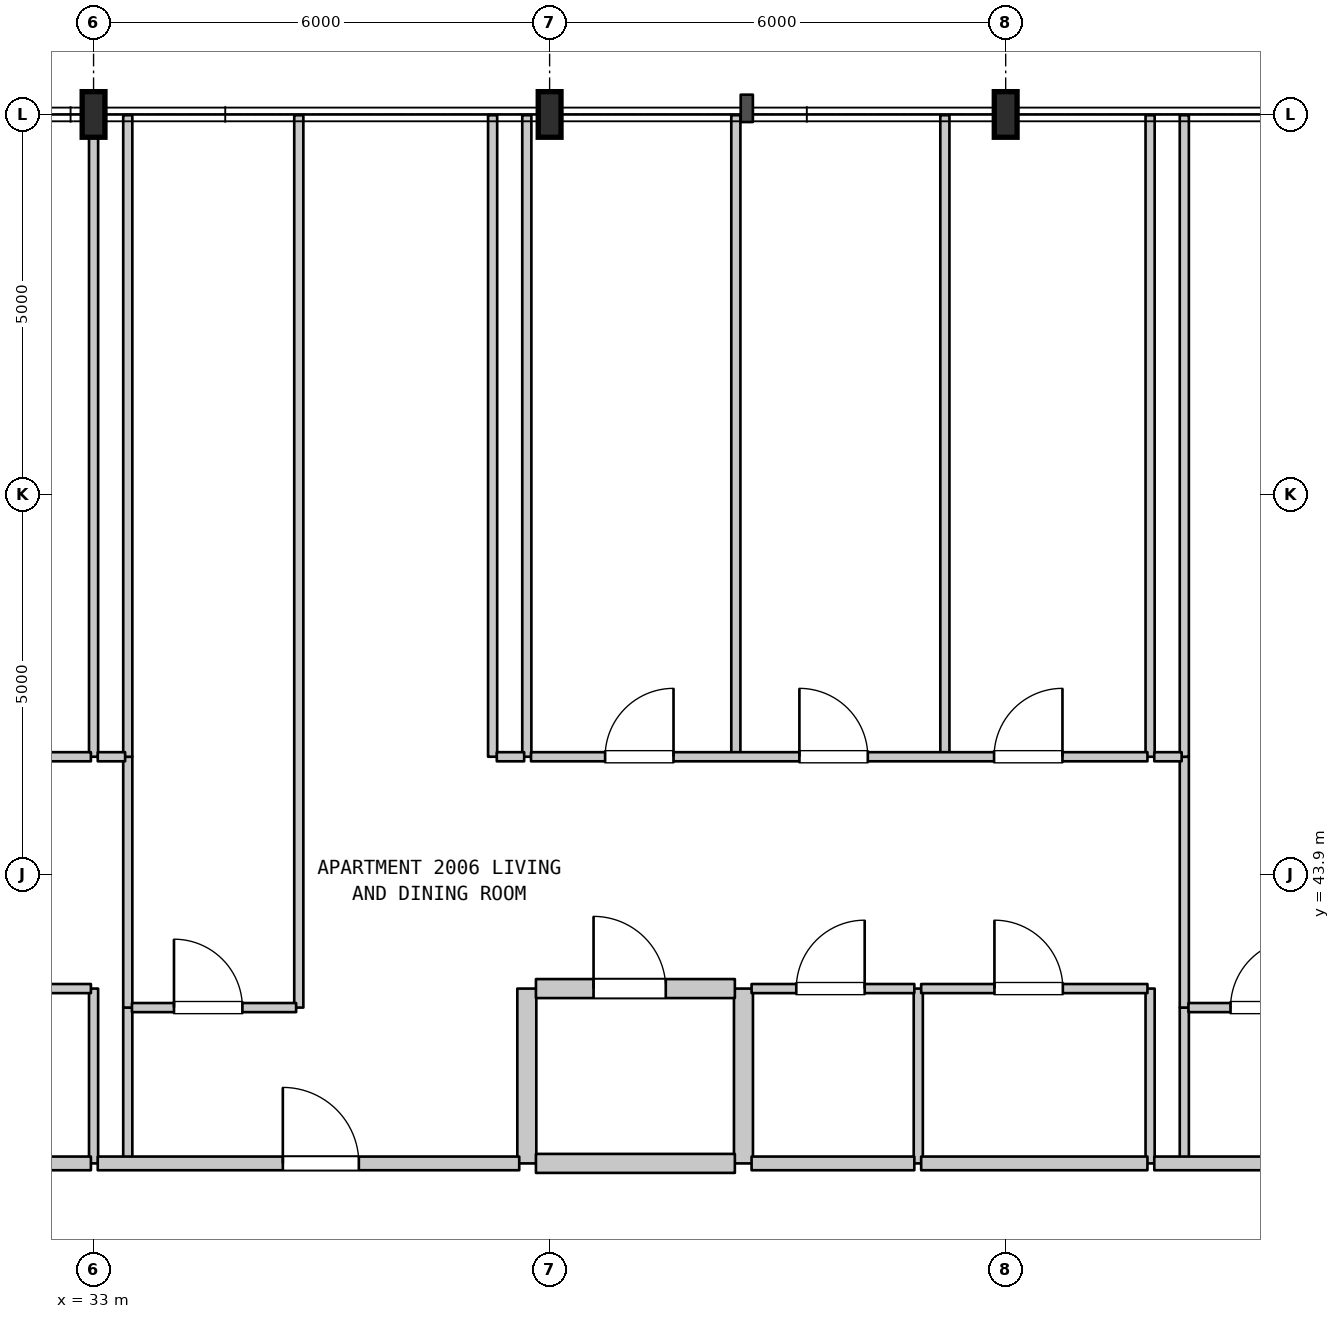
"""IFC4 building model, lengths in metres.
Left out: names, types, materials, properties, quantities, classifications, styles, units other than length and angle.
Written with IfcOpenShell. Run it as: python <this file> out.ifc"""

import sys

from ifc_helpers import new_model, si_unit, direction, frame, frame_2d, origin, origin_2d, place, context, subcontext, project, spatial, rectangle, i_section, extrude, element, fill, save


model = new_model("IFC4")
c1 = context("Model", 3, precision=1e-05, world=origin(), true_north=direction((0.0, 1.0)))
c2 = subcontext(c1, "Body", "Model", "MODEL_VIEW")
j1 = project(units=[si_unit("LENGTHUNIT", "METRE"), si_unit("PLANEANGLEUNIT", "RADIAN")], contexts=[c1])
p1 = place(None, origin())
s1 = spatial("IfcSite", under=j1, at=p1, CompositionType="ELEMENT")
p2 = place(p1, origin())
s2 = spatial("IfcBuilding", under=s1, at=p2, CompositionType="ELEMENT")
p3 = place(p2, frame((0.0, 0.0, 86.4)))
s3 = spatial("IfcBuildingStorey", under=s2, at=p3, CompositionType="ELEMENT", Elevation=86.4)
for number, where, z_axis, x_axis in (
    (1, (33.0, 53.9, 0.0), (0.0, 0.0, 1.0), (1.0, 0.0, 0.0)),
    (2, (39.0, 53.9, 0.0), (0.0, 0.0, 1.0), (1.0, 0.0, 0.0)),
    (3, (45.0, 53.9, 0.0), (0.0, 0.0, 1.0), (1.0, 0.0, 0.0)),
):
    element("IfcColumn", number, at=place(p3, frame(where, z_axis=z_axis, x_axis=x_axis)), inside=s3, PredefinedType="COLUMN", context=c2, shape_type="SweptSolid", body=[
        extrude(i_section(OverallWidth=0.3, OverallDepth=0.6, WebThickness=0.015, FlangeThickness=0.03, FilletRadius=0.027, at=origin_2d()), origin(), (0.0, 0.0, 1.0), 4.5),
    ])
p4 = place(p3, frame((33.0, 40.1, 0.0), z_axis=(0.0, 0.0, 1.0), x_axis=(0.0, 1.0, 0.0)))
e4 = element("IfcWall", 4, at=p4, inside=s3, PredefinedType="PARTITIONING", context=c2, shape_type="SweptSolid", body=[
    extrude(rectangle(XDim=2.3, YDim=0.12, at=frame_2d((1.15, 0.0))), origin(), (0.0, 0.0, 1.0), 3.585),
])
p5 = place(p3, frame((33.0, 45.45, 0.0), z_axis=(0.0, 0.0, 1.0), x_axis=(0.0, 1.0, 0.0)))
e5 = element("IfcWall", 5, at=p5, inside=s3, PredefinedType="PARTITIONING", context=c2, shape_type="SweptSolid", body=[
    extrude(rectangle(XDim=8.44, YDim=0.12, at=frame_2d((4.22, 0.0))), origin(), (0.0, 0.0, 1.0), 3.585),
])
p6 = place(p3, frame((33.45, 40.1, 0.0), z_axis=(0.0, 0.0, 1.0), x_axis=(0.0, 1.0, 0.0)))
e6 = element("IfcWall", 6, at=p6, inside=s3, PredefinedType="PARTITIONING", context=c2, shape_type="SweptSolid", body=[
    extrude(rectangle(XDim=2.05, YDim=0.12, at=frame_2d((1.025, 0.0))), origin(), (0.0, 0.0, 1.0), 4.185),
])
p7 = place(p3, frame((33.45, 42.15, 0.0), z_axis=(0.0, 0.0, 1.0), x_axis=(0.0, 1.0, 0.0)))
e7 = element("IfcWall", 7, at=p7, inside=s3, PredefinedType="PARTITIONING", context=c2, shape_type="SweptSolid", body=[
    extrude(rectangle(XDim=3.3, YDim=0.12, at=frame_2d((1.65, 0.0))), origin(), (0.0, 0.0, 1.0), 4.185),
])
p8 = place(p3, frame((33.45, 45.45, 0.0), z_axis=(0.0, 0.0, 1.0), x_axis=(0.0, 1.0, 0.0)))
e8 = element("IfcWall", 8, at=p8, inside=s3, PredefinedType="PARTITIONING", context=c2, shape_type="SweptSolid", body=[
    extrude(rectangle(XDim=8.44, YDim=0.12, at=frame_2d((4.22, 0.0))), origin(), (0.0, 0.0, 1.0), 4.185),
])
p9 = place(p3, frame((35.7, 42.15, 0.0), z_axis=(0.0, 0.0, 1.0), x_axis=(0.0, 1.0, 0.0)))
e9 = element("IfcWall", 9, at=p9, inside=s3, PredefinedType="PARTITIONING", context=c2, shape_type="SweptSolid", body=[
    extrude(rectangle(XDim=11.74, YDim=0.12, at=frame_2d((5.87, 0.0))), origin(), (0.0, 0.0, 1.0), 4.185),
])
p10 = place(p3, frame((38.25, 45.45, 0.0), z_axis=(0.0, 0.0, 1.0), x_axis=(0.0, 1.0, 0.0)))
e10 = element("IfcWall", 10, at=p10, inside=s3, PredefinedType="PARTITIONING", context=c2, shape_type="SweptSolid", body=[
    extrude(rectangle(XDim=8.44, YDim=0.12, at=frame_2d((4.22, 0.0))), origin(), (0.0, 0.0, 1.0), 4.185),
])
p11 = place(p3, frame((38.7, 40.1, 0.0), z_axis=(0.0, 0.0, 1.0), x_axis=(0.0, 1.0, 0.0)))
e11 = element("IfcWall", 11, at=p11, inside=s3, PredefinedType="STANDARD", context=c2, shape_type="SweptSolid", body=[
    extrude(rectangle(XDim=2.3, YDim=0.25, at=frame_2d((1.15, 0.0))), origin(), (0.0, 0.0, 1.0), 4.185),
])
for number, where, z_axis, x_axis in (
    (12, (38.7, 45.45, 0.0), (0.0, 0.0, 1.0), (0.0, 1.0, 0.0)),
    (13, (41.45, 45.45, 0.0), (0.0, 0.0, 1.0), (0.0, 1.0, 0.0)),
):
    element("IfcWall", number, at=place(p3, frame(where, z_axis=z_axis, x_axis=x_axis)), inside=s3, PredefinedType="PARTITIONING", context=c2, shape_type="SweptSolid", body=[
        extrude(rectangle(XDim=8.44, YDim=0.12, at=frame_2d((4.22, 0.0))), origin(), (0.0, 0.0, 1.0), 4.185),
    ])
p12 = place(p3, frame((41.55, 40.1, 0.0), z_axis=(0.0, 0.0, 1.0), x_axis=(0.0, 1.0, 0.0)))
e14 = element("IfcWall", 14, at=p12, inside=s3, PredefinedType="STANDARD", context=c2, shape_type="SweptSolid", body=[
    extrude(rectangle(XDim=2.3, YDim=0.25, at=frame_2d((1.15, 0.0))), origin(), (0.0, 0.0, 1.0), 4.185),
])
p13 = place(p3, frame((43.85, 40.1, 0.0), z_axis=(0.0, 0.0, 1.0), x_axis=(0.0, 1.0, 0.0)))
e15 = element("IfcWall", 15, at=p13, inside=s3, PredefinedType="PARTITIONING", context=c2, shape_type="SweptSolid", body=[
    extrude(rectangle(XDim=2.3, YDim=0.12, at=frame_2d((1.15, 0.0))), origin(), (0.0, 0.0, 1.0), 4.185),
])
p14 = place(p3, frame((44.2, 45.45, 0.0), z_axis=(0.0, 0.0, 1.0), x_axis=(0.0, 1.0, 0.0)))
e16 = element("IfcWall", 16, at=p14, inside=s3, PredefinedType="PARTITIONING", context=c2, shape_type="SweptSolid", body=[
    extrude(rectangle(XDim=8.44, YDim=0.12, at=frame_2d((4.22, 0.0))), origin(), (0.0, 0.0, 1.0), 4.185),
])
p15 = place(p3, frame((46.9, 40.1, 0.0), z_axis=(0.0, 0.0, 1.0), x_axis=(0.0, 1.0, 0.0)))
e17 = element("IfcWall", 17, at=p15, inside=s3, PredefinedType="PARTITIONING", context=c2, shape_type="SweptSolid", body=[
    extrude(rectangle(XDim=2.3, YDim=0.12, at=frame_2d((1.15, 0.0))), origin(), (0.0, 0.0, 1.0), 4.185),
])
p16 = place(p3, frame((46.9, 45.45, 0.0), z_axis=(0.0, 0.0, 1.0), x_axis=(0.0, 1.0, 0.0)))
e18 = element("IfcWall", 18, at=p16, inside=s3, PredefinedType="PARTITIONING", context=c2, shape_type="SweptSolid", body=[
    extrude(rectangle(XDim=8.44, YDim=0.12, at=frame_2d((4.22, 0.0))), origin(), (0.0, 0.0, 1.0), 4.185),
])
p17 = place(p3, frame((47.35, 40.1, 0.0), z_axis=(0.0, 0.0, 1.0), x_axis=(0.0, 1.0, 0.0)))
e19 = element("IfcWall", 19, at=p17, inside=s3, PredefinedType="PARTITIONING", context=c2, shape_type="SweptSolid", body=[
    extrude(rectangle(XDim=2.05, YDim=0.12, at=frame_2d((1.025, 0.0))), origin(), (0.0, 0.0, 1.0), 4.185),
])
p18 = place(p3, frame((47.35, 42.15, 0.0), z_axis=(0.0, 0.0, 1.0), x_axis=(0.0, 1.0, 0.0)))
e20 = element("IfcWall", 20, at=p18, inside=s3, PredefinedType="PARTITIONING", context=c2, shape_type="SweptSolid", body=[
    extrude(rectangle(XDim=3.3, YDim=0.12, at=frame_2d((1.65, 0.0))), origin(), (0.0, 0.0, 1.0), 4.185),
])
p19 = place(p3, frame((47.35, 45.45, 0.0), z_axis=(0.0, 0.0, 1.0), x_axis=(0.0, 1.0, 0.0)))
e21 = element("IfcWall", 21, at=p19, inside=s3, PredefinedType="PARTITIONING", context=c2, shape_type="SweptSolid", body=[
    extrude(rectangle(XDim=8.44, YDim=0.12, at=frame_2d((4.22, 0.0))), origin(), (0.0, 0.0, 1.0), 4.185),
])
p20 = place(p3, frame((29.383, 40.1, 0.0), z_axis=(0.0, 0.0, 1.0), x_axis=(1.0, 0.0, 0.0)))
e22 = element("IfcWall", 22, at=p20, inside=s3, PredefinedType="STANDARD", context=c2, shape_type="SweptSolid", body=[
    extrude(rectangle(XDim=3.582, YDim=0.18, at=frame_2d((1.791, 0.0))), origin(), (0.0, 0.0, 1.0), 4.185),
])
p21 = place(p3, frame((33.055, 40.1, 0.0), z_axis=(0.0, 0.0, 1.0), x_axis=(1.0, 0.0, 0.0)))
e23 = element("IfcWall", 23, at=p21, inside=s3, PredefinedType="STANDARD", context=c2, shape_type="SweptSolid", body=[
    extrude(rectangle(XDim=5.545, YDim=0.18, at=frame_2d((2.772, 0.0))), origin(), (0.0, 0.0, 1.0), 4.185),
])
p22 = place(p21, frame((2.435, 0.0, 0.0)))
e24 = element("IfcOpeningElement", 24, at=p22, cuts=e23, PredefinedType="OPENING", context=c2, shape_type="SweptSolid", body=[
    extrude(rectangle(XDim=1.0, YDim=2.15, at=frame_2d((0.5, 1.075))), frame((0.0, 0.1, 0.0), z_axis=(0.0, -1.0, 0.0), x_axis=(1.0, 0.0, 0.0)), (0.0, 0.0, 1.0), 0.2),
])
p23 = place(p3, frame((38.82, 40.1, 0.0), z_axis=(0.0, 0.0, 1.0), x_axis=(1.0, 0.0, 0.0)))
e25 = element("IfcWall", 25, at=p23, inside=s3, PredefinedType="STANDARD", context=c2, shape_type="SweptSolid", body=[
    extrude(rectangle(XDim=2.617, YDim=0.25, at=frame_2d((1.309, 0.0))), origin(), (0.0, 0.0, 1.0), 4.185),
])
p24 = place(p3, frame((41.657, 40.1, 0.0), z_axis=(0.0, 0.0, 1.0), x_axis=(1.0, 0.0, 0.0)))
e26 = element("IfcWall", 26, at=p24, inside=s3, PredefinedType="STANDARD", context=c2, shape_type="SweptSolid", body=[
    extrude(rectangle(XDim=2.141, YDim=0.18, at=frame_2d((1.071, 0.0))), origin(), (0.0, 0.0, 1.0), 4.185),
])
p25 = place(p3, frame((43.888, 40.1, 0.0), z_axis=(0.0, 0.0, 1.0), x_axis=(1.0, 0.0, 0.0)))
e27 = element("IfcWall", 27, at=p25, inside=s3, PredefinedType="STANDARD", context=c2, shape_type="SweptSolid", body=[
    extrude(rectangle(XDim=2.977, YDim=0.18, at=frame_2d((1.489, 0.0))), origin(), (0.0, 0.0, 1.0), 4.185),
])
p26 = place(p3, frame((46.955, 40.1, 0.0), z_axis=(0.0, 0.0, 1.0), x_axis=(1.0, 0.0, 0.0)))
e28 = element("IfcWall", 28, at=p26, inside=s3, PredefinedType="STANDARD", context=c2, shape_type="SweptSolid", body=[
    extrude(rectangle(XDim=5.61, YDim=0.18, at=frame_2d((2.805, 0.0))), origin(), (0.0, 0.0, 1.0), 4.185),
])
p27 = place(p26, frame((2.435, 0.0, 0.0)))
e29 = element("IfcOpeningElement", 29, at=p27, cuts=e28, PredefinedType="OPENING", context=c2, shape_type="SweptSolid", body=[
    extrude(rectangle(XDim=1.0, YDim=2.15, at=frame_2d((0.5, 1.075))), frame((0.0, 0.1, 0.0), z_axis=(0.0, -1.0, 0.0), x_axis=(1.0, 0.0, 0.0)), (0.0, 0.0, 1.0), 0.2),
])
p28 = place(p3, frame((33.505, 42.15, 0.0), z_axis=(0.0, 0.0, 1.0), x_axis=(1.0, 0.0, 0.0)))
e30 = element("IfcWall", 30, at=p28, inside=s3, PredefinedType="PARTITIONING", context=c2, shape_type="SweptSolid", body=[
    extrude(rectangle(XDim=2.16, YDim=0.12, at=frame_2d((1.08, 0.0))), origin(), (0.0, 0.0, 1.0), 4.185),
])
p29 = place(p28, frame((0.553, 0.0, 0.0)))
e31 = element("IfcOpeningElement", 31, at=p29, cuts=e30, PredefinedType="OPENING", context=c2, shape_type="SweptSolid", body=[
    extrude(rectangle(XDim=0.9, YDim=2.15, at=frame_2d((0.45, 1.075))), frame((0.0, 0.07, 0.0), z_axis=(0.0, -1.0, 0.0), x_axis=(1.0, 0.0, 0.0)), (0.0, 0.0, 1.0), 0.14),
])
p30 = place(p3, frame((47.405, 42.15, 0.0), z_axis=(0.0, 0.0, 1.0), x_axis=(1.0, 0.0, 0.0)))
e32 = element("IfcWall", 32, at=p30, inside=s3, PredefinedType="PARTITIONING", context=c2, shape_type="SweptSolid", body=[
    extrude(rectangle(XDim=2.16, YDim=0.12, at=frame_2d((1.08, 0.0))), origin(), (0.0, 0.0, 1.0), 4.185),
])
p31 = place(p30, frame((0.553, 0.0, 0.0)))
e33 = element("IfcOpeningElement", 33, at=p31, cuts=e32, PredefinedType="OPENING", context=c2, shape_type="SweptSolid", body=[
    extrude(rectangle(XDim=0.9, YDim=2.15, at=frame_2d((0.45, 1.075))), frame((0.0, 0.07, 0.0), z_axis=(0.0, -1.0, 0.0), x_axis=(1.0, 0.0, 0.0)), (0.0, 0.0, 1.0), 0.14),
])
p32 = place(p3, frame((29.383, 42.4, 0.0), z_axis=(0.0, 0.0, 1.0), x_axis=(1.0, 0.0, 0.0)))
e34 = element("IfcWall", 34, at=p32, inside=s3, PredefinedType="PARTITIONING", context=c2, shape_type="SweptSolid", body=[
    extrude(rectangle(XDim=3.582, YDim=0.12, at=frame_2d((1.791, 0.0))), origin(), (0.0, 0.0, 1.0), 4.185),
])
p33 = place(p32, frame((1.341, 0.0, 0.0)))
e35 = element("IfcOpeningElement", 35, at=p33, cuts=e34, PredefinedType="OPENING", context=c2, shape_type="SweptSolid", body=[
    extrude(rectangle(XDim=0.9, YDim=2.1, at=frame_2d((0.45, 1.05))), frame((0.0, 0.07, 0.0), z_axis=(0.0, -1.0, 0.0), x_axis=(1.0, 0.0, 0.0)), (0.0, 0.0, 1.0), 0.14),
])
p34 = place(p3, frame((38.82, 42.4, 0.0), z_axis=(0.0, 0.0, 1.0), x_axis=(1.0, 0.0, 0.0)))
e36 = element("IfcWall", 36, at=p34, inside=s3, PredefinedType="STANDARD", context=c2, shape_type="SweptSolid", body=[
    extrude(rectangle(XDim=2.617, YDim=0.25, at=frame_2d((1.309, 0.0))), origin(), (0.0, 0.0, 1.0), 4.185),
])
p35 = place(p34, frame((0.758, 0.0, 0.0)))
e37 = element("IfcOpeningElement", 37, at=p35, cuts=e36, PredefinedType="OPENING", context=c2, shape_type="SweptSolid", body=[
    extrude(rectangle(XDim=0.95, YDim=2.15, at=frame_2d((0.475, 1.075))), frame((0.0, 0.135, 0.0), z_axis=(0.0, -1.0, 0.0), x_axis=(1.0, 0.0, 0.0)), (0.0, 0.0, 1.0), 0.27),
])
p36 = place(p3, frame((41.657, 42.4, 0.0), z_axis=(0.0, 0.0, 1.0), x_axis=(1.0, 0.0, 0.0)))
e38 = element("IfcWall", 38, at=p36, inside=s3, PredefinedType="PARTITIONING", context=c2, shape_type="SweptSolid", body=[
    extrude(rectangle(XDim=2.141, YDim=0.12, at=frame_2d((1.071, 0.0))), origin(), (0.0, 0.0, 1.0), 4.185),
])
p37 = place(p36, frame((0.588, 0.0, 0.0)))
e39 = element("IfcOpeningElement", 39, at=p37, cuts=e38, PredefinedType="OPENING", context=c2, shape_type="SweptSolid", body=[
    extrude(rectangle(XDim=0.9, YDim=2.1, at=frame_2d((0.45, 1.05))), frame((0.0, 0.07, 0.0), z_axis=(0.0, -1.0, 0.0), x_axis=(1.0, 0.0, 0.0)), (0.0, 0.0, 1.0), 0.14),
])
p38 = place(p3, frame((43.888, 42.4, 0.0), z_axis=(0.0, 0.0, 1.0), x_axis=(1.0, 0.0, 0.0)))
e40 = element("IfcWall", 40, at=p38, inside=s3, PredefinedType="PARTITIONING", context=c2, shape_type="SweptSolid", body=[
    extrude(rectangle(XDim=2.977, YDim=0.12, at=frame_2d((1.489, 0.0))), origin(), (0.0, 0.0, 1.0), 4.185),
])
p39 = place(p38, frame((0.964, 0.0, 0.0)))
e41 = element("IfcOpeningElement", 41, at=p39, cuts=e40, PredefinedType="OPENING", context=c2, shape_type="SweptSolid", body=[
    extrude(rectangle(XDim=0.9, YDim=2.15, at=frame_2d((0.45, 1.075))), frame((0.0, 0.07, 0.0), z_axis=(0.0, -1.0, 0.0), x_axis=(1.0, 0.0, 0.0)), (0.0, 0.0, 1.0), 0.14),
])
p40 = place(p3, frame((26.255, 45.45, 0.0), z_axis=(0.0, 0.0, 1.0), x_axis=(1.0, 0.0, 0.0)))
e42 = element("IfcWall", 42, at=p40, inside=s3, PredefinedType="PARTITIONING", context=c2, shape_type="SweptSolid", body=[
    extrude(rectangle(XDim=6.71, YDim=0.12, at=frame_2d((3.355, 0.0))), origin(), (0.0, 0.0, 1.0), 4.185),
])
p41 = place(p40, frame((1.306, 0.0, 0.0)))
e43 = element("IfcOpeningElement", 43, at=p41, cuts=e42, PredefinedType="OPENING", context=c2, shape_type="SweptSolid", body=[
    extrude(rectangle(XDim=0.9, YDim=2.15, at=frame_2d((0.45, 1.075))), frame((0.0, 0.07, 0.0), z_axis=(0.0, -1.0, 0.0), x_axis=(1.0, 0.0, 0.0)), (0.0, 0.0, 1.0), 0.14),
])
p42 = place(p40, frame((4.356, 0.0, 0.0)))
e44 = element("IfcOpeningElement", 44, at=p42, cuts=e42, PredefinedType="OPENING", context=c2, shape_type="SweptSolid", body=[
    extrude(rectangle(XDim=0.9, YDim=2.15, at=frame_2d((0.45, 1.075))), frame((0.0, 0.07, 0.0), z_axis=(0.0, -1.0, 0.0), x_axis=(1.0, 0.0, 0.0)), (0.0, 0.0, 1.0), 0.14),
])
for number, where, z_axis, x_axis in (
    (45, (33.055, 45.45, 0.0), (0.0, 0.0, 1.0), (1.0, 0.0, 0.0)),
    (46, (38.305, 45.45, 0.0), (0.0, 0.0, 1.0), (1.0, 0.0, 0.0)),
):
    element("IfcWall", number, at=place(p3, frame(where, z_axis=z_axis, x_axis=x_axis)), inside=s3, PredefinedType="PARTITIONING", context=c2, shape_type="SweptSolid", body=[
        extrude(rectangle(XDim=0.36, YDim=0.12, at=frame_2d((0.18, 0.0))), origin(), (0.0, 0.0, 1.0), 4.185),
    ])
p43 = place(p3, frame((38.755, 45.45, 0.0), z_axis=(0.0, 0.0, 1.0), x_axis=(1.0, 0.0, 0.0)))
e47 = element("IfcWall", 47, at=p43, inside=s3, PredefinedType="PARTITIONING", context=c2, shape_type="SweptSolid", body=[
    extrude(rectangle(XDim=8.11, YDim=0.12, at=frame_2d((4.055, 0.0))), origin(), (0.0, 0.0, 1.0), 4.185),
])
p44 = place(p43, frame((0.975, 0.0, 0.0)))
e48 = element("IfcOpeningElement", 48, at=p44, cuts=e47, PredefinedType="OPENING", context=c2, shape_type="SweptSolid", body=[
    extrude(rectangle(XDim=0.9, YDim=2.15, at=frame_2d((0.45, 1.075))), frame((0.0, 0.07, 0.0), z_axis=(0.0, -1.0, 0.0), x_axis=(1.0, 0.0, 0.0)), (0.0, 0.0, 1.0), 0.14),
])
p45 = place(p43, frame((3.531, 0.0, 0.0)))
e49 = element("IfcOpeningElement", 49, at=p45, cuts=e47, PredefinedType="OPENING", context=c2, shape_type="SweptSolid", body=[
    extrude(rectangle(XDim=0.9, YDim=2.15, at=frame_2d((0.45, 1.075))), frame((0.0, 0.07, 0.0), z_axis=(0.0, -1.0, 0.0), x_axis=(1.0, 0.0, 0.0)), (0.0, 0.0, 1.0), 0.14),
])
p46 = place(p43, frame((6.092, 0.0, 0.0)))
e50 = element("IfcOpeningElement", 50, at=p46, cuts=e47, PredefinedType="OPENING", context=c2, shape_type="SweptSolid", body=[
    extrude(rectangle(XDim=0.9, YDim=2.15, at=frame_2d((0.45, 1.075))), frame((0.0, 0.07, 0.0), z_axis=(0.0, -1.0, 0.0), x_axis=(1.0, 0.0, 0.0)), (0.0, 0.0, 1.0), 0.14),
])
p47 = place(p3, frame((46.955, 45.45, 0.0), z_axis=(0.0, 0.0, 1.0), x_axis=(1.0, 0.0, 0.0)))
e51 = element("IfcWall", 51, at=p47, inside=s3, PredefinedType="PARTITIONING", context=c2, shape_type="SweptSolid", body=[
    extrude(rectangle(XDim=0.36, YDim=0.12, at=frame_2d((0.18, 0.0))), origin(), (0.0, 0.0, 1.0), 4.185),
])
p48 = place(p22, origin())
e52 = element("IfcDoor", 52, at=p48, inside=s3, OperationType="SINGLE_SWING_LEFT", PredefinedType="DOOR", context=c2, shape_type="SweptSolid", body=[
    extrude(rectangle(XDim=1.0, YDim=2.15, at=frame_2d((0.5, 1.075))), frame((0.0, 0.025, 0.0), z_axis=(0.0, -1.0, 0.0), x_axis=(1.0, 0.0, 0.0)), (0.0, 0.0, 1.0), 0.05),
])
fill(e24, e52)
p49 = place(p29, origin())
e53 = element("IfcDoor", 53, at=p49, inside=s3, OperationType="SINGLE_SWING_LEFT", PredefinedType="DOOR", context=c2, shape_type="SweptSolid", body=[
    extrude(rectangle(XDim=0.9, YDim=2.15, at=frame_2d((0.45, 1.075))), frame((0.0, 0.025, 0.0), z_axis=(0.0, -1.0, 0.0), x_axis=(1.0, 0.0, 0.0)), (0.0, 0.0, 1.0), 0.05),
])
fill(e31, e53)
p50 = place(p31, origin())
e54 = element("IfcDoor", 54, at=p50, inside=s3, OperationType="SINGLE_SWING_RIGHT", PredefinedType="DOOR", context=c2, shape_type="SweptSolid", body=[
    extrude(rectangle(XDim=0.9, YDim=2.15, at=frame_2d((0.45, 1.075))), frame((0.0, 0.025, 0.0), z_axis=(0.0, -1.0, 0.0), x_axis=(1.0, 0.0, 0.0)), (0.0, 0.0, 1.0), 0.05),
])
fill(e33, e54)
p51 = place(p35, origin())
e55 = element("IfcDoor", 55, at=p51, inside=s3, OperationType="SINGLE_SWING_LEFT", PredefinedType="DOOR", context=c2, shape_type="SweptSolid", body=[
    extrude(rectangle(XDim=0.95, YDim=2.15, at=frame_2d((0.475, 1.075))), frame((0.0, 0.025, 0.0), z_axis=(0.0, -1.0, 0.0), x_axis=(1.0, 0.0, 0.0)), (0.0, 0.0, 1.0), 0.05),
])
fill(e37, e55)
p52 = place(p37, origin())
e56 = element("IfcDoor", 56, at=p52, inside=s3, OperationType="SINGLE_SWING_RIGHT", PredefinedType="DOOR", context=c2, shape_type="SweptSolid", body=[
    extrude(rectangle(XDim=0.9, YDim=2.1, at=frame_2d((0.45, 1.05))), frame((0.0, 0.025, 0.0), z_axis=(0.0, -1.0, 0.0), x_axis=(1.0, 0.0, 0.0)), (0.0, 0.0, 1.0), 0.05),
])
fill(e39, e56)
p53 = place(p39, origin())
e57 = element("IfcDoor", 57, at=p53, inside=s3, OperationType="SINGLE_SWING_LEFT", PredefinedType="DOOR", context=c2, shape_type="SweptSolid", body=[
    extrude(rectangle(XDim=0.9, YDim=2.15, at=frame_2d((0.45, 1.075))), frame((0.0, 0.025, 0.0), z_axis=(0.0, -1.0, 0.0), x_axis=(1.0, 0.0, 0.0)), (0.0, 0.0, 1.0), 0.05),
])
fill(e41, e57)
p54 = place(p44, origin())
e58 = element("IfcDoor", 58, at=p54, inside=s3, OperationType="SINGLE_SWING_RIGHT", PredefinedType="DOOR", context=c2, shape_type="SweptSolid", body=[
    extrude(rectangle(XDim=0.9, YDim=2.15, at=frame_2d((0.45, 1.075))), frame((0.0, 0.025, 0.0), z_axis=(0.0, -1.0, 0.0), x_axis=(1.0, 0.0, 0.0)), (0.0, 0.0, 1.0), 0.05),
])
fill(e48, e58)
p55 = place(p45, origin())
e59 = element("IfcDoor", 59, at=p55, inside=s3, OperationType="SINGLE_SWING_LEFT", PredefinedType="DOOR", context=c2, shape_type="SweptSolid", body=[
    extrude(rectangle(XDim=0.9, YDim=2.15, at=frame_2d((0.45, 1.075))), frame((0.0, 0.025, 0.0), z_axis=(0.0, -1.0, 0.0), x_axis=(1.0, 0.0, 0.0)), (0.0, 0.0, 1.0), 0.05),
])
fill(e49, e59)
p56 = place(p46, origin())
e60 = element("IfcDoor", 60, at=p56, inside=s3, OperationType="SINGLE_SWING_RIGHT", PredefinedType="DOOR", context=c2, shape_type="SweptSolid", body=[
    extrude(rectangle(XDim=0.9, YDim=2.15, at=frame_2d((0.45, 1.075))), frame((0.0, 0.025, 0.0), z_axis=(0.0, -1.0, 0.0), x_axis=(1.0, 0.0, 0.0)), (0.0, 0.0, 1.0), 0.05),
])
fill(e50, e60)
save(model, sys.argv[1])
